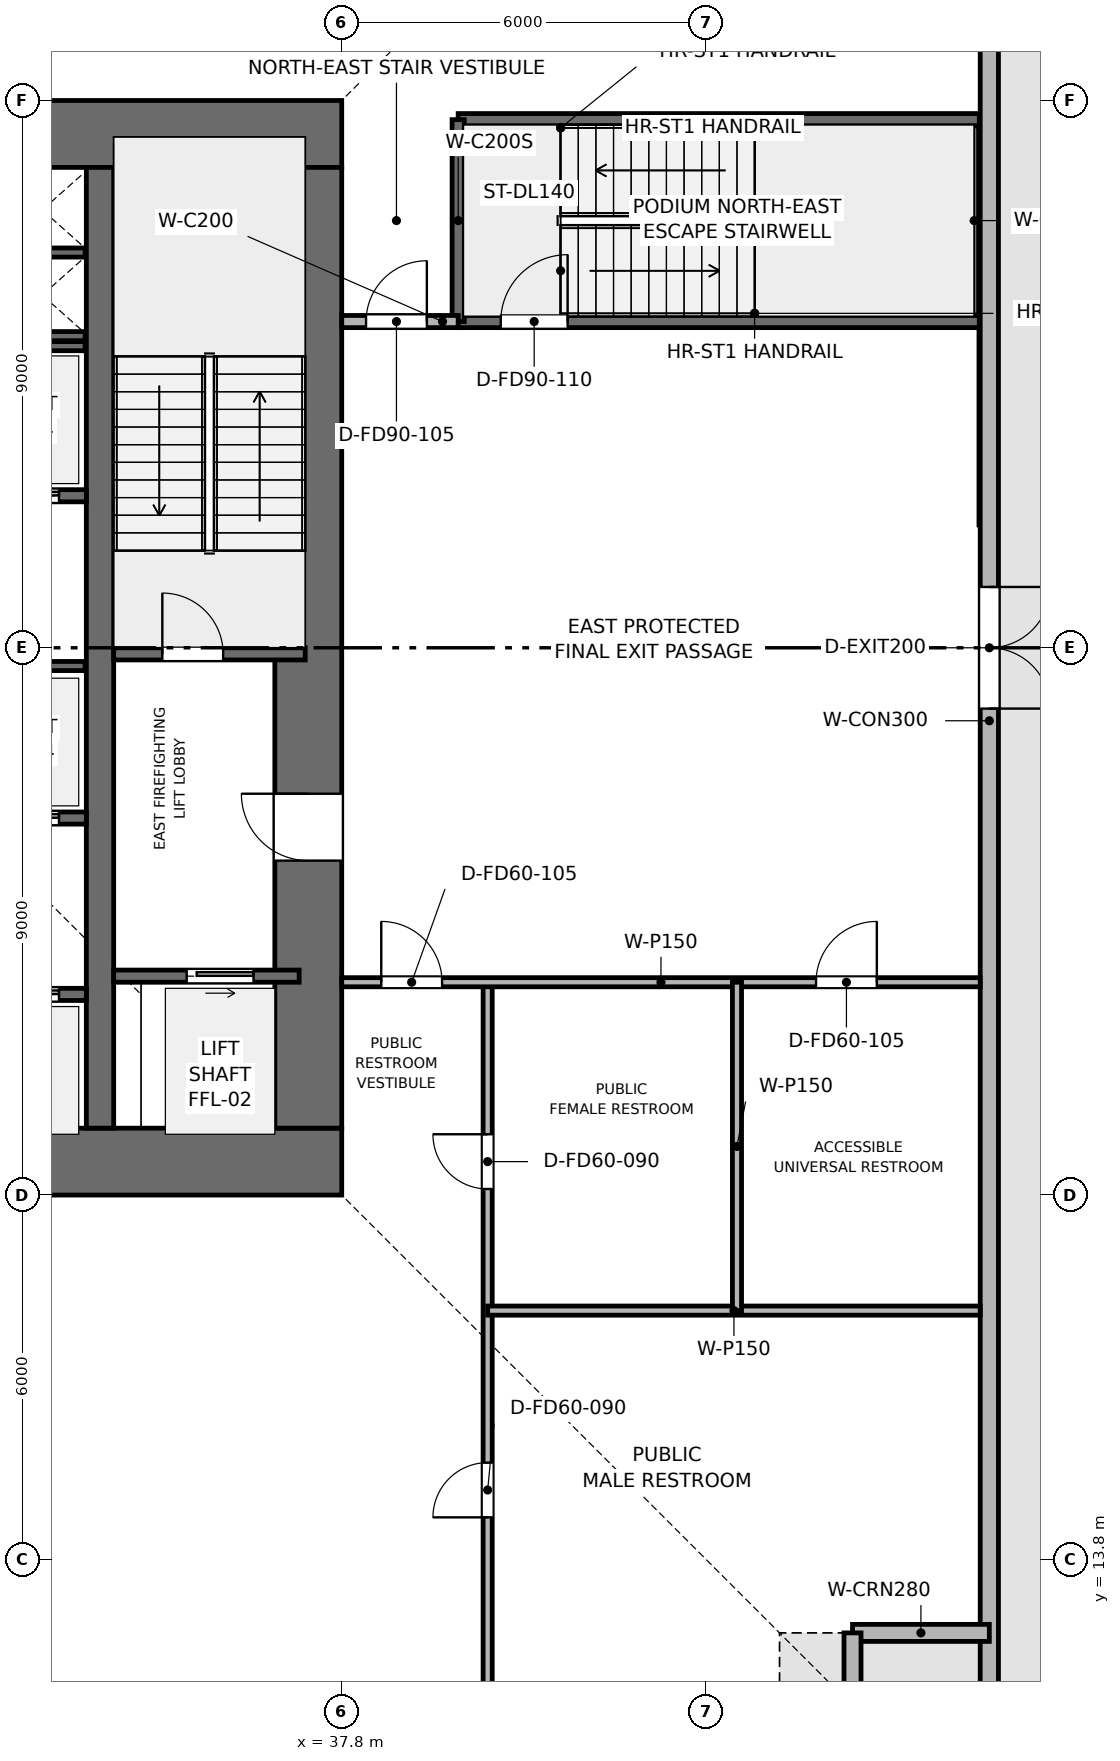
"""IFC4 building model, lengths in metres.
Left out: names, types, materials, properties, quantities, classifications, styles, units other than length and angle.
Written with IfcOpenShell. Run it as: python <this file> out.ifc"""

import sys

from ifc_helpers import new_model, si_unit, direction, frame, frame_2d, origin, place, context, subcontext, project, spatial, rectangle, extrude, element, fill, save


model = new_model("IFC4")
c1 = context("Model", 3, precision=1e-05, world=origin(), true_north=direction((0.0, 1.0)))
c2 = subcontext(c1, "Body", "Model", "MODEL_VIEW")
j1 = project(units=[si_unit("LENGTHUNIT", "METRE"), si_unit("PLANEANGLEUNIT", "RADIAN")], contexts=[c1])
p1 = place(None, origin())
s1 = spatial("IfcSite", under=j1, at=p1, CompositionType="ELEMENT")
p2 = place(p1, origin())
s2 = spatial("IfcBuilding", under=s1, at=p2, CompositionType="ELEMENT")
p3 = place(p2, origin())
s3 = spatial("IfcBuildingStorey", under=s2, at=p3, CompositionType="ELEMENT", Elevation=0.0)
p4 = place(p3, frame((19.8, 20.35, 0.0), z_axis=(0.0, 0.0, 1.0), x_axis=(1.0, 0.0, 0.0)))
e1 = element("IfcWall", 1, at=p4, inside=s3, PredefinedType="SHEAR", context=c2, shape_type="SweptSolid", body=[
    extrude(rectangle(XDim=18.0, YDim=1.1, at=frame_2d((9.0, 0.0))), origin(), (0.0, 0.0, 1.0), 8.4),
])
p5 = place(p4, frame((8.4, 0.0, 0.0)))
e2 = element("IfcOpeningElement", 2, at=p5, cuts=e1, PredefinedType="OPENING", context=c2, shape_type="SweptSolid", body=[
    extrude(rectangle(XDim=1.2, YDim=2.2, at=frame_2d((0.6, 1.1))), frame((0.0, 0.56, 0.0), z_axis=(0.0, -1.0, 0.0), x_axis=(1.0, 0.0, 0.0)), (0.0, 0.0, 1.0), 1.12),
])
p6 = place(p3, frame((19.8, 37.25, 0.0), z_axis=(0.0, 0.0, 1.0), x_axis=(1.0, 0.0, 0.0)))
e3 = element("IfcWall", 3, at=p6, inside=s3, PredefinedType="SHEAR", context=c2, shape_type="SweptSolid", body=[
    extrude(rectangle(XDim=18.0, YDim=1.1, at=frame_2d((9.0, 0.0))), origin(), (0.0, 0.0, 1.0), 8.4),
])
p7 = place(p6, frame((7.05, 0.0, 0.0)))
e4 = element("IfcOpeningElement", 4, at=p7, cuts=e3, PredefinedType="OPENING", context=c2, shape_type="SweptSolid", body=[
    extrude(rectangle(XDim=1.1, YDim=2.15, at=frame_2d((0.55, 1.075))), frame((0.0, 0.56, 0.0), z_axis=(0.0, -1.0, 0.0), x_axis=(1.0, 0.0, 0.0)), (0.0, 0.0, 1.0), 1.12),
])
p8 = place(p3, frame((37.25, 20.9, 0.0), z_axis=(0.0, 0.0, 1.0), x_axis=(0.0, 1.0, 0.0)))
e5 = element("IfcWall", 5, at=p8, inside=s3, PredefinedType="SHEAR", context=c2, shape_type="SweptSolid", body=[
    extrude(rectangle(XDim=15.8, YDim=1.1, at=frame_2d((7.9, 0.0))), origin(), (0.0, 0.0, 1.0), 8.4),
])
p9 = place(p8, frame((4.4, 0.0, 0.0)))
e6 = element("IfcOpeningElement", 6, at=p9, cuts=e5, PredefinedType="OPENING", context=c2, shape_type="SweptSolid", body=[
    extrude(rectangle(XDim=1.1, YDim=2.15, at=frame_2d((0.55, 1.075))), frame((0.0, 0.56, 0.0), z_axis=(0.0, -1.0, 0.0), x_axis=(1.0, 0.0, 0.0)), (0.0, 0.0, 1.0), 1.12),
])
p10 = place(p3, frame((33.825, 20.9, 0.0), z_axis=(0.0, 0.0, 1.0), x_axis=(0.0, 1.0, 0.0)))
e7 = element("IfcWall", 7, at=p10, inside=s3, PredefinedType="SHEAR", context=c2, shape_type="SweptSolid", body=[
    extrude(rectangle(XDim=15.8, YDim=0.45, at=frame_2d((7.9, 0.0))), origin(), (0.0, 0.0, 1.0), 8.4),
])
p11 = place(p3, frame((48.45, 46.2, 0.0), z_axis=(0.0, 0.0, 1.0), x_axis=(0.0, -1.0, 0.0)))
e8 = element("IfcWall", 8, at=p11, inside=s3, PredefinedType="SOLIDWALL", context=c2, shape_type="SweptSolid", body=[
    extrude(rectangle(XDim=34.8, YDim=0.3, at=frame_2d((17.4, 0.0))), origin(), (0.0, 0.0, 1.0), 8.05),
])
p12 = place(p11, frame((16.4, 0.0, 0.0)))
e9 = element("IfcOpeningElement", 9, at=p12, cuts=e8, PredefinedType="OPENING", context=c2, shape_type="SweptSolid", body=[
    extrude(rectangle(XDim=2.0, YDim=2.4, at=frame_2d((1.0, 1.2))), frame((0.0, 0.16, 0.0), z_axis=(0.0, -1.0, 0.0), x_axis=(1.0, 0.0, 0.0)), (0.0, 0.0, 1.0), 0.32),
])
p13 = place(p3, frame((48.45, 12.6, 0.0), z_axis=(0.0, 0.0, 1.0), x_axis=(-1.0, 0.0, 0.0)))
e10 = element("IfcWall", 10, at=p13, inside=s3, PredefinedType="SOLIDWALL", context=c2, shape_type="SweptSolid", body=[
    extrude(rectangle(XDim=2.25, YDim=0.28, at=frame_2d((1.125, 0.0))), origin(), (0.0, 0.0, 1.0), 8.05),
])
p14 = place(p3, frame((46.2, 12.6, 0.0), z_axis=(0.0, 0.0, 1.0), x_axis=(0.0, -1.0, 0.0)))
e11 = element("IfcWall", 11, at=p14, inside=s3, PredefinedType="SOLIDWALL", context=c2, shape_type="SweptSolid", body=[
    extrude(rectangle(XDim=3.45, YDim=0.28, at=frame_2d((1.725, 0.0))), origin(), (0.0, 0.0, 1.0), 8.05),
])
p15 = place(p3, frame((34.05, 28.7, 0.0), z_axis=(0.0, 0.0, 1.0), x_axis=(1.0, 0.0, 0.0)))
e12 = element("IfcWall", 12, at=p15, inside=s3, PredefinedType="SHEAR", context=c2, shape_type="SweptSolid", body=[
    extrude(rectangle(XDim=3.15, YDim=0.2, at=frame_2d((1.575, 0.0))), origin(), (0.0, 0.0, 1.0), 8.05),
])
p16 = place(p15, frame((0.8, 0.0, 0.0)))
e13 = element("IfcOpeningElement", 13, at=p16, cuts=e12, PredefinedType="OPENING", context=c2, shape_type="SweptSolid", body=[
    extrude(rectangle(XDim=1.0, YDim=2.1, at=frame_2d((0.5, 1.05))), frame((0.0, 0.11, 0.0), z_axis=(0.0, -1.0, 0.0), x_axis=(1.0, 0.0, 0.0)), (0.0, 0.0, 1.0), 0.22),
])
for number, where, z_axis, x_axis in (
    (14, (32.25, 33.925, 0.0), (0.0, 0.0, 1.0), (1.0, 0.0, 0.0)),
    (15, (32.25, 35.3, 0.0), (0.0, 0.0, 1.0), (1.0, 0.0, 0.0)),
):
    element("IfcWall", number, at=place(p3, frame(where, z_axis=z_axis, x_axis=x_axis)), inside=s3, PredefinedType="SHEAR", context=c2, shape_type="SweptSolid", body=[
        extrude(rectangle(XDim=1.33, YDim=0.15, at=frame_2d((0.665, 0.0))), origin(), (0.0, 0.0, 1.0), 8.05),
    ])
p17 = place(p3, frame((34.05, 23.4, 0.0), z_axis=(0.0, 0.0, 1.0), x_axis=(1.0, 0.0, 0.0)))
e16 = element("IfcWall", 16, at=p17, inside=s3, PredefinedType="SHEAR", context=c2, shape_type="SweptSolid", body=[
    extrude(rectangle(XDim=3.05, YDim=0.2, at=frame_2d((1.525, 0.0))), origin(), (0.0, 0.0, 1.0), 8.05),
])
p18 = place(p17, frame((1.2, 0.0, 0.0)))
e17 = element("IfcOpeningElement", 17, at=p18, cuts=e16, PredefinedType="OPENING", context=c2, shape_type="SweptSolid", body=[
    extrude(rectangle(XDim=1.1, YDim=2.15, at=frame_2d((0.55, 1.075))), frame((0.0, 0.11, 0.0), z_axis=(0.0, -1.0, 0.0), x_axis=(1.0, 0.0, 0.0)), (0.0, 0.0, 1.0), 0.22),
])
p19 = place(p3, frame((31.6, 23.1, 0.0), z_axis=(0.0, 0.0, 1.0), x_axis=(1.0, 0.0, 0.0)))
e18 = element("IfcWall", 18, at=p19, inside=s3, PredefinedType="SHEAR", context=c2, shape_type="SweptSolid", body=[
    extrude(rectangle(XDim=2.0, YDim=0.2, at=frame_2d((1.0, 0.0))), origin(), (0.0, 0.0, 1.0), 8.05),
])
p20 = place(p19, frame((0.45, 0.0, 0.0)))
e19 = element("IfcOpeningElement", 19, at=p20, cuts=e18, PredefinedType="OPENING", context=c2, shape_type="SweptSolid", body=[
    extrude(rectangle(XDim=1.1, YDim=2.15, at=frame_2d((0.55, 1.075))), frame((0.0, 0.11, 0.0), z_axis=(0.0, -1.0, 0.0), x_axis=(1.0, 0.0, 0.0)), (0.0, 0.0, 1.0), 0.22),
])
p21 = place(p3, frame((31.6, 26.0, 0.0), z_axis=(0.0, 0.0, 1.0), x_axis=(1.0, 0.0, 0.0)))
e20 = element("IfcWall", 20, at=p21, inside=s3, PredefinedType="SHEAR", context=c2, shape_type="SweptSolid", body=[
    extrude(rectangle(XDim=2.0, YDim=0.2, at=frame_2d((1.0, 0.0))), origin(), (0.0, 0.0, 1.0), 8.05),
])
p22 = place(p21, frame((0.45, 0.0, 0.0)))
e21 = element("IfcOpeningElement", 21, at=p22, cuts=e20, PredefinedType="OPENING", context=c2, shape_type="SweptSolid", body=[
    extrude(rectangle(XDim=1.1, YDim=2.15, at=frame_2d((0.55, 1.075))), frame((0.0, 0.11, 0.0), z_axis=(0.0, -1.0, 0.0), x_axis=(1.0, 0.0, 0.0)), (0.0, 0.0, 1.0), 0.22),
])
p23 = place(p3, frame((31.6, 31.3, 0.0), z_axis=(0.0, 0.0, 1.0), x_axis=(1.0, 0.0, 0.0)))
e22 = element("IfcWall", 22, at=p23, inside=s3, PredefinedType="SHEAR", context=c2, shape_type="SweptSolid", body=[
    extrude(rectangle(XDim=2.0, YDim=0.2, at=frame_2d((1.0, 0.0))), origin(), (0.0, 0.0, 1.0), 8.05),
])
p24 = place(p23, frame((0.45, 0.0, 0.0)))
e23 = element("IfcOpeningElement", 23, at=p24, cuts=e22, PredefinedType="OPENING", context=c2, shape_type="SweptSolid", body=[
    extrude(rectangle(XDim=1.1, YDim=2.15, at=frame_2d((0.55, 1.075))), frame((0.0, 0.11, 0.0), z_axis=(0.0, -1.0, 0.0), x_axis=(1.0, 0.0, 0.0)), (0.0, 0.0, 1.0), 0.22),
])
for number, where, z_axis, x_axis in (
    (24, (29.5, 28.5, 0.0), (0.0, 0.0, 1.0), (1.0, 0.0, 0.0)),
    (25, (29.5, 33.76, 0.0), (0.0, 0.0, 1.0), (1.0, 0.0, 0.0)),
):
    element("IfcWall", number, at=place(p3, frame(where, z_axis=z_axis, x_axis=x_axis)), inside=s3, PredefinedType="SHEAR", context=c2, shape_type="SweptSolid", body=[
        extrude(rectangle(XDim=4.08, YDim=0.15, at=frame_2d((2.04, 0.0))), origin(), (0.0, 0.0, 1.0), 8.05),
    ])
p25 = place(p3, frame((39.715, 34.165, 0.0), z_axis=(0.0, 0.0, 1.0), x_axis=(1.0, 0.0, 0.0)))
e26 = element("IfcWall", 26, at=p25, inside=s3, PredefinedType="SHEAR", context=c2, shape_type="SweptSolid", body=[
    extrude(rectangle(XDim=8.57, YDim=0.2, at=frame_2d((4.285, 0.0))), origin(), (0.0, 0.0, 1.0), 8.398),
])
p26 = place(p25, frame((0.7, 0.0, 0.0)))
e27 = element("IfcOpeningElement", 27, at=p26, cuts=e26, PredefinedType="OPENING", context=c2, shape_type="SweptSolid", body=[
    extrude(rectangle(XDim=1.1, YDim=2.15, at=frame_2d((0.55, 1.075))), frame((0.0, 0.11, 0.0), z_axis=(0.0, -1.0, 0.0), x_axis=(1.0, 0.0, 0.0)), (0.0, 0.0, 1.0), 0.22),
])
p27 = place(p3, frame((39.715, 37.485, 0.0), z_axis=(0.0, 0.0, 1.0), x_axis=(1.0, 0.0, 0.0)))
e28 = element("IfcWall", 28, at=p27, inside=s3, PredefinedType="SHEAR", context=c2, shape_type="SweptSolid", body=[
    extrude(rectangle(XDim=8.57, YDim=0.2, at=frame_2d((4.285, 0.0))), origin(), (0.0, 0.0, 1.0), 8.398),
])
p28 = place(p3, frame((48.2, 34.27, 0.0), z_axis=(0.0, 0.0, 1.0), x_axis=(0.0, 1.0, 0.0)))
e29 = element("IfcWall", 29, at=p28, inside=s3, PredefinedType="SHEAR", context=c2, shape_type="SweptSolid", body=[
    extrude(rectangle(XDim=3.11, YDim=0.15, at=frame_2d((1.555, 0.0))), origin(), (0.0, 0.0, 1.0), 8.398),
])
p29 = place(p3, frame((39.715, 34.165, 0.0), z_axis=(0.0, 0.0, 1.0), x_axis=(0.0, 1.0, 0.0)))
e30 = element("IfcWall", 30, at=p29, inside=s3, PredefinedType="SHEAR", context=c2, shape_type="SweptSolid", body=[
    extrude(rectangle(XDim=3.32, YDim=0.2, at=frame_2d((1.66, 0.0))), origin(), (0.0, 0.0, 1.0), 8.398),
])
p30 = place(p3, frame((37.8, 34.165, 0.0), z_axis=(0.0, 0.0, 1.0), x_axis=(1.0, 0.0, 0.0)))
e31 = element("IfcWall", 31, at=p30, inside=s3, PredefinedType="PARTITIONING", context=c2, shape_type="SweptSolid", body=[
    extrude(rectangle(XDim=1.915, YDim=0.2, at=frame_2d((0.958, 0.0))), origin(), (0.0, 0.0, 1.0), 8.05),
])
p31 = place(p30, frame((0.4, 0.0, 0.0)))
e32 = element("IfcOpeningElement", 32, at=p31, cuts=e31, PredefinedType="OPENING", context=c2, shape_type="SweptSolid", body=[
    extrude(rectangle(XDim=1.0, YDim=2.15, at=frame_2d((0.5, 1.075))), frame((0.0, 0.11, 0.0), z_axis=(0.0, -1.0, 0.0), x_axis=(1.0, 0.0, 0.0)), (0.0, 0.0, 1.0), 0.22),
])
p32 = place(p3, frame((40.2, 9.3, 0.0), z_axis=(0.0, 0.0, 1.0), x_axis=(0.0, 1.0, 0.0)))
e33 = element("IfcWall", 33, at=p32, inside=s3, PredefinedType="PARTITIONING", context=c2, shape_type="SweptSolid", body=[
    extrude(rectangle(XDim=14.0, YDim=0.15, at=frame_2d((7.0, 0.0))), origin(), (0.0, 0.0, 1.0), 7.135),
])
p33 = place(p32, frame((5.2, 0.0, 0.0)))
e34 = element("IfcOpeningElement", 34, at=p33, cuts=e33, PredefinedType="OPENING", context=c2, shape_type="SweptSolid", body=[
    extrude(rectangle(XDim=0.9, YDim=2.1, at=frame_2d((0.45, 1.05))), frame((0.0, 0.085, 0.0), z_axis=(0.0, -1.0, 0.0), x_axis=(1.0, 0.0, 0.0)), (0.0, 0.0, 1.0), 0.17),
])
p34 = place(p32, frame((10.6, 0.0, 0.0)))
e35 = element("IfcOpeningElement", 35, at=p34, cuts=e33, PredefinedType="OPENING", context=c2, shape_type="SweptSolid", body=[
    extrude(rectangle(XDim=0.9, YDim=2.1, at=frame_2d((0.45, 1.05))), frame((0.0, 0.085, 0.0), z_axis=(0.0, -1.0, 0.0), x_axis=(1.0, 0.0, 0.0)), (0.0, 0.0, 1.0), 0.17),
])
p35 = place(p3, frame((37.8, 23.3, 0.0), z_axis=(0.0, 0.0, 1.0), x_axis=(1.0, 0.0, 0.0)))
e36 = element("IfcWall", 36, at=p35, inside=s3, PredefinedType="PARTITIONING", context=c2, shape_type="SweptSolid", body=[
    extrude(rectangle(XDim=10.5, YDim=0.15, at=frame_2d((5.25, 0.0))), origin(), (0.0, 0.0, 1.0), 8.05),
])
p36 = place(p35, frame((0.65, 0.0, 0.0)))
e37 = element("IfcOpeningElement", 37, at=p36, cuts=e36, PredefinedType="OPENING", context=c2, shape_type="SweptSolid", body=[
    extrude(rectangle(XDim=1.0, YDim=2.15, at=frame_2d((0.5, 1.075))), frame((0.0, 0.085, 0.0), z_axis=(0.0, -1.0, 0.0), x_axis=(1.0, 0.0, 0.0)), (0.0, 0.0, 1.0), 0.17),
])
p37 = place(p35, frame((7.8, 0.0, 0.0)))
e38 = element("IfcOpeningElement", 38, at=p37, cuts=e36, PredefinedType="OPENING", context=c2, shape_type="SweptSolid", body=[
    extrude(rectangle(XDim=1.0, YDim=2.15, at=frame_2d((0.5, 1.075))), frame((0.0, 0.085, 0.0), z_axis=(0.0, -1.0, 0.0), x_axis=(1.0, 0.0, 0.0)), (0.0, 0.0, 1.0), 0.17),
])
p38 = place(p3, frame((40.2, 17.9, 0.0), z_axis=(0.0, 0.0, 1.0), x_axis=(1.0, 0.0, 0.0)))
e39 = element("IfcWall", 39, at=p38, inside=s3, PredefinedType="PARTITIONING", context=c2, shape_type="SweptSolid", body=[
    extrude(rectangle(XDim=8.1, YDim=0.15, at=frame_2d((4.05, 0.0))), origin(), (0.0, 0.0, 1.0), 8.05),
])
p39 = place(p3, frame((44.3, 17.9, 0.0), z_axis=(0.0, 0.0, 1.0), x_axis=(0.0, 1.0, 0.0)))
e40 = element("IfcWall", 40, at=p39, inside=s3, PredefinedType="PARTITIONING", context=c2, shape_type="SweptSolid", body=[
    extrude(rectangle(XDim=5.4, YDim=0.15, at=frame_2d((2.7, 0.0))), origin(), (0.0, 0.0, 1.0), 8.05),
])
p40 = place(p12, origin())
e41 = element("IfcDoor", 41, at=p40, inside=s3, OperationType="DOUBLE_DOOR_SINGLE_SWING", PredefinedType="DOOR", context=c2, shape_type="SweptSolid", body=[
    extrude(rectangle(XDim=2.0, YDim=2.4, at=frame_2d((1.0, 1.2))), frame((0.0, 0.025, 0.0), z_axis=(0.0, -1.0, 0.0), x_axis=(1.0, 0.0, 0.0)), (0.0, 0.0, 1.0), 0.05),
])
fill(e9, e41)
p41 = place(p16, origin())
e42 = element("IfcDoor", 42, at=p41, inside=s3, OperationType="SINGLE_SWING_LEFT", PredefinedType="DOOR", context=c2, shape_type="SweptSolid", body=[
    extrude(rectangle(XDim=1.0, YDim=2.1, at=frame_2d((0.5, 1.05))), frame((0.0, 0.025, 0.0), z_axis=(0.0, -1.0, 0.0), x_axis=(1.0, 0.0, 0.0)), (0.0, 0.0, 1.0), 0.05),
])
fill(e13, e42)
p42 = place(p18, origin())
e43 = element("IfcDoor", 43, at=p42, inside=s3, OperationType="SLIDING_TO_RIGHT", PredefinedType="DOOR", context=c2, shape_type="SweptSolid", body=[
    extrude(rectangle(XDim=1.1, YDim=2.15, at=frame_2d((0.55, 1.075))), frame((0.0, 0.025, 0.0), z_axis=(0.0, -1.0, 0.0), x_axis=(1.0, 0.0, 0.0)), (0.0, 0.0, 1.0), 0.05),
])
fill(e17, e43)
p43 = place(p20, origin())
e44 = element("IfcDoor", 44, at=p43, inside=s3, OperationType="SLIDING_TO_RIGHT", PredefinedType="DOOR", context=c2, shape_type="SweptSolid", body=[
    extrude(rectangle(XDim=1.1, YDim=2.15, at=frame_2d((0.55, 1.075))), frame((0.0, 0.025, 0.0), z_axis=(0.0, -1.0, 0.0), x_axis=(1.0, 0.0, 0.0)), (0.0, 0.0, 1.0), 0.05),
])
fill(e19, e44)
p44 = place(p22, origin())
e45 = element("IfcDoor", 45, at=p44, inside=s3, OperationType="SLIDING_TO_RIGHT", PredefinedType="DOOR", context=c2, shape_type="SweptSolid", body=[
    extrude(rectangle(XDim=1.1, YDim=2.15, at=frame_2d((0.55, 1.075))), frame((0.0, 0.025, 0.0), z_axis=(0.0, -1.0, 0.0), x_axis=(1.0, 0.0, 0.0)), (0.0, 0.0, 1.0), 0.05),
])
fill(e21, e45)
p45 = place(p24, origin())
e46 = element("IfcDoor", 46, at=p45, inside=s3, OperationType="SLIDING_TO_RIGHT", PredefinedType="DOOR", context=c2, shape_type="SweptSolid", body=[
    extrude(rectangle(XDim=1.1, YDim=2.15, at=frame_2d((0.55, 1.075))), frame((0.0, 0.025, 0.0), z_axis=(0.0, -1.0, 0.0), x_axis=(1.0, 0.0, 0.0)), (0.0, 0.0, 1.0), 0.05),
])
fill(e23, e46)
p46 = place(p26, origin())
e47 = element("IfcDoor", 47, at=p46, inside=s3, OperationType="SINGLE_SWING_RIGHT", PredefinedType="DOOR", context=c2, shape_type="SweptSolid", body=[
    extrude(rectangle(XDim=1.1, YDim=2.15, at=frame_2d((0.55, 1.075))), frame((0.0, 0.025, 0.0), z_axis=(0.0, -1.0, 0.0), x_axis=(1.0, 0.0, 0.0)), (0.0, 0.0, 1.0), 0.05),
])
fill(e27, e47)
p47 = place(p31, origin())
e48 = element("IfcDoor", 48, at=p47, inside=s3, OperationType="SINGLE_SWING_RIGHT", PredefinedType="DOOR", context=c2, shape_type="SweptSolid", body=[
    extrude(rectangle(XDim=1.0, YDim=2.15, at=frame_2d((0.5, 1.075))), frame((0.0, 0.025, 0.0), z_axis=(0.0, -1.0, 0.0), x_axis=(1.0, 0.0, 0.0)), (0.0, 0.0, 1.0), 0.05),
])
fill(e32, e48)
p48 = place(p33, origin())
e49 = element("IfcDoor", 49, at=p48, inside=s3, OperationType="SINGLE_SWING_LEFT", PredefinedType="DOOR", context=c2, shape_type="SweptSolid", body=[
    extrude(rectangle(XDim=0.9, YDim=2.1, at=frame_2d((0.45, 1.05))), frame((0.0, 0.025, 0.0), z_axis=(0.0, -1.0, 0.0), x_axis=(1.0, 0.0, 0.0)), (0.0, 0.0, 1.0), 0.05),
])
fill(e34, e49)
p49 = place(p34, origin())
e50 = element("IfcDoor", 50, at=p49, inside=s3, OperationType="SINGLE_SWING_RIGHT", PredefinedType="DOOR", context=c2, shape_type="SweptSolid", body=[
    extrude(rectangle(XDim=0.9, YDim=2.1, at=frame_2d((0.45, 1.05))), frame((0.0, 0.025, 0.0), z_axis=(0.0, -1.0, 0.0), x_axis=(1.0, 0.0, 0.0)), (0.0, 0.0, 1.0), 0.05),
])
fill(e35, e50)
p50 = place(p36, origin())
e51 = element("IfcDoor", 51, at=p50, inside=s3, OperationType="SINGLE_SWING_LEFT", PredefinedType="DOOR", context=c2, shape_type="SweptSolid", body=[
    extrude(rectangle(XDim=1.0, YDim=2.15, at=frame_2d((0.5, 1.075))), frame((0.0, 0.025, 0.0), z_axis=(0.0, -1.0, 0.0), x_axis=(1.0, 0.0, 0.0)), (0.0, 0.0, 1.0), 0.05),
])
fill(e37, e51)
p51 = place(p37, origin())
e52 = element("IfcDoor", 52, at=p51, inside=s3, OperationType="SINGLE_SWING_RIGHT", PredefinedType="DOOR", context=c2, shape_type="SweptSolid", body=[
    extrude(rectangle(XDim=1.0, YDim=2.15, at=frame_2d((0.5, 1.075))), frame((0.0, 0.025, 0.0), z_axis=(0.0, -1.0, 0.0), x_axis=(1.0, 0.0, 0.0)), (0.0, 0.0, 1.0), 0.05),
])
fill(e38, e52)
p52 = place(p9, origin())
e53 = element("IfcDoor", 53, at=p52, inside=s3, OperationType="SINGLE_SWING_RIGHT", PredefinedType="DOOR", context=c2, shape_type="SweptSolid", body=[
    extrude(rectangle(XDim=1.1, YDim=2.15, at=frame_2d((0.55, 1.075))), frame((0.0, 0.025, 0.0), z_axis=(0.0, -1.0, 0.0), x_axis=(1.0, 0.0, 0.0)), (0.0, 0.0, 1.0), 0.05),
])
fill(e6, e53)
save(model, sys.argv[1])
